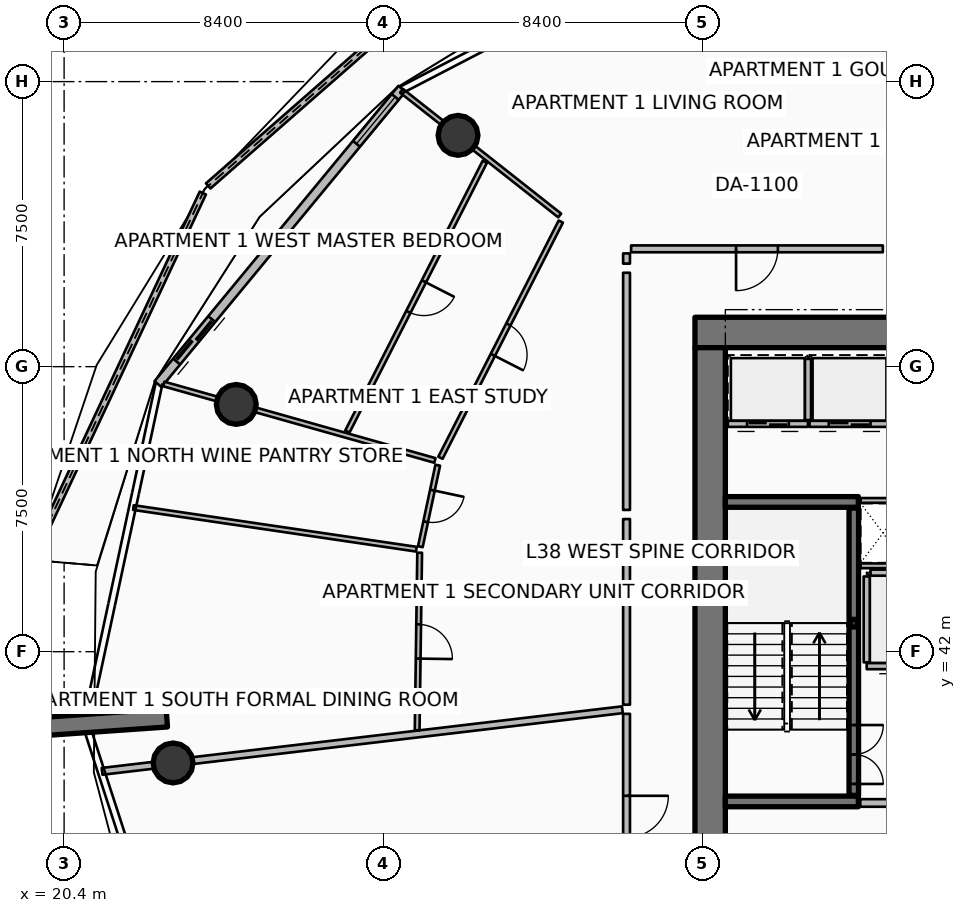
"""IFC4 building model, lengths in metres.
Left out: names, types, materials, properties, quantities, classifications, styles, units other than length and angle.
Written with IfcOpenShell. Run it as: python <this file> out.ifc"""

import sys

from ifc_helpers import new_model, si_unit, direction, frame, frame_2d, origin, origin_2d, place, context, subcontext, project, spatial, polyline, rectangle, hollow_rectangle, circle, outline, extrude, element, fill, save


model = new_model("IFC4")
c1 = context("Model", 3, precision=1e-05, world=origin(), true_north=direction((0.0, 1.0)))
c2 = subcontext(c1, "Body", "Model", "MODEL_VIEW")
j1 = project(units=[si_unit("LENGTHUNIT", "METRE"), si_unit("PLANEANGLEUNIT", "RADIAN")], contexts=[c1])
p1 = place(None, origin())
s1 = spatial("IfcSite", under=j1, at=p1, CompositionType="ELEMENT")
p2 = place(p1, origin())
s2 = spatial("IfcBuilding", under=s1, at=p2, CompositionType="ELEMENT")
p3 = place(p2, frame((0.0, 0.0, 154.05)))
s3 = spatial("IfcBuildingStorey", under=s2, at=p3, CompositionType="ELEMENT", Elevation=154.05)
p4 = place(p3, frame((37.0, 50.4, 0.0), z_axis=(0.0, 0.0, 1.0), x_axis=(1.0, 0.0, 0.0)))
e1 = element("IfcWall", 1, at=p4, inside=s3, PredefinedType="SHEAR", context=c2, shape_type="SweptSolid", body=[
    extrude(rectangle(XDim=9.9, YDim=0.8, at=frame_2d((4.95, 0.0))), origin(), (0.0, 0.0, 1.0), 3.75),
])
p5 = place(p3, frame((37.4, 34.0, 0.0), z_axis=(0.0, 0.0, 1.0), x_axis=(0.0, 1.0, 0.0)))
e2 = element("IfcWall", 2, at=p5, inside=s3, PredefinedType="SHEAR", context=c2, shape_type="SweptSolid", body=[
    extrude(rectangle(XDim=16.0, YDim=0.8, at=frame_2d((8.0, 0.0))), origin(), (0.0, 0.0, 1.0), 3.75),
])
for number, where, z_axis, x_axis in (
    (3, (37.8, 38.06, 0.0), (0.0, 0.0, 1.0), (1.0, 0.0, 0.0)),
    (4, (37.8, 45.94, 0.0), (0.0, 0.0, 1.0), (1.0, 0.0, 0.0)),
):
    element("IfcWall", number, at=place(p3, frame(where, z_axis=z_axis, x_axis=x_axis)), inside=s3, PredefinedType="SHEAR", context=c2, shape_type="SweptSolid", body=[
        extrude(rectangle(XDim=3.5, YDim=0.28, at=frame_2d((1.75, 0.0))), origin(), (0.0, 0.0, 1.0), 3.75),
    ])
p6 = place(p3, frame((41.18, 42.75, 0.0), z_axis=(0.0, 0.0, 1.0), x_axis=(1.0, 0.0, 0.0)))
e5 = element("IfcColumn", 5, at=p6, inside=s3, PredefinedType="COLUMN", context=c2, shape_type="SweptSolid", body=[
    extrude(hollow_rectangle(XDim=0.2, YDim=0.2, WallThickness=0.01, InnerFilletRadius=0.01, OuterFilletRadius=0.02, at=origin_2d()), origin(), (0.0, 0.0, 1.0), 1.67),
])
p7 = place(p3, frame((23.103, 40.259, 0.0), z_axis=(0.0, 0.0, 1.0), x_axis=(-0.997564163539, -0.069754853754, 0.0)))
e6 = element("IfcWall", 6, at=p7, inside=s3, PredefinedType="SOLIDWALL", context=c2, shape_type="SweptSolid", body=[
    extrude(rectangle(XDim=3.5, YDim=0.48, at=frame_2d((1.75, 0.0))), origin(), (0.0, 0.0, 1.0), 3.75),
])
for number, where, z_axis, x_axis in (
    (7, (30.766, 55.586, 0.0), (0.0, 0.0, 1.0), (1.0, 0.0, 0.0)),
    (8, (24.93, 48.506, 0.0), (0.0, 0.0, 1.0), (1.0, 0.0, 0.0)),
    (9, (23.267, 39.073, 0.0), (0.0, 0.0, 1.0), (1.0, 0.0, 0.0)),
):
    element("IfcColumn", number, at=place(p3, frame(where, z_axis=z_axis, x_axis=x_axis)), inside=s3, PredefinedType="COLUMN", context=c2, shape_type="SweptSolid", body=[
        extrude(circle(Radius=0.525, at=origin_2d()), origin(), (0.0, 0.0, 1.0), 3.5),
    ])
p8 = place(p3, frame((31.712, 60.836, 0.0), z_axis=(0.0, 0.0, 1.0), x_axis=(-0.752617556845, -0.658457905358, 0.0)))
e10 = element("IfcWall", 10, at=p8, inside=s3, PredefinedType="PARAPET", context=c2, shape_type="SweptSolid", body=[
    extrude(outline(polyline([(0.0, 0.0), (9.993, 0.0), (9.993, 1.148), (4.997, 1.284), (0.0, 1.483), (0.0, 0.0)])), frame((0.0, 0.09, 0.0), z_axis=(0.0, -1.0, 0.0), x_axis=(1.0, 0.0, 0.0)), (0.0, 0.0, 1.0), 0.18),
])
p9 = place(p3, frame((24.05, 54.068, 0.0), z_axis=(0.0, 0.0, 1.0), x_axis=(-0.424190329226, -0.905573058671, 0.0)))
e11 = element("IfcWall", 11, at=p9, inside=s3, PredefinedType="PARAPET", context=c2, shape_type="SweptSolid", body=[
    extrude(outline(polyline([(0.0, 0.0), (10.659, 0.0), (10.659, 1.224), (5.33, 1.127), (0.0, 1.148), (0.0, 0.0)])), frame((0.0, 0.09, 0.0), z_axis=(0.0, -1.0, 0.0), x_axis=(1.0, 0.0, 0.0)), (0.0, 0.0, 1.0), 0.18),
])
p10 = place(p3, frame((29.291, 56.813, 0.0), z_axis=(0.0, 0.0, 1.0), x_axis=(-0.636771922292, -0.77105221547, 0.0)))
e12 = element("IfcWall", 12, at=p10, inside=s3, PredefinedType="SOLIDWALL", context=c2, shape_type="SweptSolid", body=[
    extrude(rectangle(XDim=10.082, YDim=0.24, at=frame_2d((5.041, 0.0))), origin(), (0.0, 0.0, 1.0), 2.45),
])
p11 = place(p10, frame((7.862, 0.0, 0.0)))
e13 = element("IfcOpeningElement", 13, at=p11, cuts=e12, PredefinedType="OPENING", context=c2, shape_type="SweptSolid", body=[
    extrude(rectangle(XDim=1.45, YDim=2.15, at=frame_2d((0.725, 1.075))), frame((0.0, 0.13, 0.0), z_axis=(0.0, -1.0, 0.0), x_axis=(1.0, 0.0, 0.0)), (0.0, 0.0, 1.0), 0.26),
])
p12 = place(p10, frame((0.28, 0.0, 0.65)))
e14 = element("IfcOpeningElement", 14, at=p12, cuts=e12, PredefinedType="OPENING", context=c2, shape_type="SweptSolid", body=[
    extrude(rectangle(XDim=1.6, YDim=1.5, at=frame_2d((0.8, 0.75))), frame((0.0, 0.13, 0.0), z_axis=(0.0, -1.0, 0.0), x_axis=(1.0, 0.0, 0.0)), (0.0, 0.0, 1.0), 0.26),
])
p13 = place(p3, frame((41.18, 38.22, 0.0), z_axis=(0.0, 0.0, 1.0), x_axis=(0.0, 1.0, 0.0)))
e15 = element("IfcWall", 15, at=p13, inside=s3, PredefinedType="SOLIDWALL", context=c2, shape_type="SweptSolid", body=[
    extrude(rectangle(XDim=7.56, YDim=0.25, at=frame_2d((3.78, 0.0))), origin(), (0.0, 0.0, 1.0), 3.5),
])
p14 = place(p13, frame((0.3, 0.0, 0.0)))
e16 = element("IfcOpeningElement", 16, at=p14, cuts=e15, PredefinedType="OPENING", context=c2, shape_type="SweptSolid", body=[
    extrude(rectangle(XDim=1.55, YDim=2.15, at=frame_2d((0.775, 1.075))), frame((0.0, 0.135, 0.0), z_axis=(0.0, -1.0, 0.0), x_axis=(1.0, 0.0, 0.0)), (0.0, 0.0, 1.0), 0.27),
])
p15 = place(p3, frame((39.975, 47.995, 0.0), z_axis=(0.0, 0.0, 1.0), x_axis=(-1.0, 0.0, 0.0)))
e17 = element("IfcWall", 17, at=p15, inside=s3, PredefinedType="PARTITIONING", context=c2, shape_type="SweptSolid", body=[
    extrude(rectangle(XDim=2.11, YDim=0.16, at=frame_2d((1.055, 0.0))), origin(), (0.0, 0.0, 1.0), 3.5),
])
p16 = place(p15, frame((0.505, 0.0, 0.0)))
e18 = element("IfcOpeningElement", 18, at=p16, cuts=e17, PredefinedType="OPENING", context=c2, shape_type="SweptSolid", body=[
    extrude(rectangle(XDim=1.1, YDim=2.1, at=frame_2d((0.55, 1.05))), frame((0.0, 0.09, 0.0), z_axis=(0.0, -1.0, 0.0), x_axis=(1.0, 0.0, 0.0)), (0.0, 0.0, 1.0), 0.18),
])
p17 = place(p3, frame((39.975, 48.095, 0.0), z_axis=(0.0, 0.0, 1.0), x_axis=(0.0, 1.0, 0.0)))
e19 = element("IfcWall", 19, at=p17, inside=s3, PredefinedType="PARTITIONING", context=c2, shape_type="SweptSolid", body=[
    extrude(rectangle(XDim=1.61, YDim=0.16, at=frame_2d((0.805, 0.0))), origin(), (0.0, 0.0, 1.0), 3.5),
])
p18 = place(p3, frame((42.125, 47.995, 0.0), z_axis=(0.0, 0.0, 1.0), x_axis=(-1.0, 0.0, 0.0)))
e20 = element("IfcWall", 20, at=p18, inside=s3, PredefinedType="PARTITIONING", context=c2, shape_type="SweptSolid", body=[
    extrude(rectangle(XDim=2.11, YDim=0.16, at=frame_2d((1.055, 0.0))), origin(), (0.0, 0.0, 1.0), 3.5),
])
p19 = place(p18, frame((0.505, 0.0, 0.0)))
e21 = element("IfcOpeningElement", 21, at=p19, cuts=e20, PredefinedType="OPENING", context=c2, shape_type="SweptSolid", body=[
    extrude(rectangle(XDim=1.1, YDim=2.1, at=frame_2d((0.55, 1.05))), frame((0.0, 0.09, 0.0), z_axis=(0.0, -1.0, 0.0), x_axis=(1.0, 0.0, 0.0)), (0.0, 0.0, 1.0), 0.18),
])
p20 = place(p3, frame((43.78, 41.62, 0.0), z_axis=(0.0, 0.0, 1.0), x_axis=(-1.0, 0.0, 0.0)))
e22 = element("IfcWall", 22, at=p20, inside=s3, PredefinedType="PARTITIONING", context=c2, shape_type="SweptSolid", body=[
    extrude(rectangle(XDim=2.26, YDim=0.16, at=frame_2d((1.13, 0.0))), origin(), (0.0, 0.0, 1.0), 3.5),
])
p21 = place(p20, frame((0.58, 0.0, 0.0)))
e23 = element("IfcOpeningElement", 23, at=p21, cuts=e22, PredefinedType="OPENING", context=c2, shape_type="SweptSolid", body=[
    extrude(rectangle(XDim=1.1, YDim=2.1, at=frame_2d((0.55, 1.05))), frame((0.0, 0.09, 0.0), z_axis=(0.0, -1.0, 0.0), x_axis=(1.0, 0.0, 0.0)), (0.0, 0.0, 1.0), 0.18),
])
p22 = place(p3, frame((41.52, 41.72, 0.0), z_axis=(0.0, 0.0, 1.0), x_axis=(0.0, 1.0, 0.0)))
e24 = element("IfcWall", 24, at=p22, inside=s3, PredefinedType="PARTITIONING", context=c2, shape_type="SweptSolid", body=[
    extrude(rectangle(XDim=2.26, YDim=0.16, at=frame_2d((1.13, 0.0))), origin(), (0.0, 0.0, 1.0), 3.5),
])
p23 = place(p3, frame((41.62, 44.08, 0.0), z_axis=(0.0, 0.0, 1.0), x_axis=(1.0, 0.0, 0.0)))
e25 = element("IfcWall", 25, at=p23, inside=s3, PredefinedType="PARTITIONING", context=c2, shape_type="SweptSolid", body=[
    extrude(rectangle(XDim=2.06, YDim=0.16, at=frame_2d((1.03, 0.0))), origin(), (0.0, 0.0, 1.0), 3.5),
])
p24 = place(p3, frame((41.35, 38.02, 0.0), z_axis=(0.0, 0.0, 1.0), x_axis=(1.0, 0.0, 0.0)))
e26 = element("IfcWall", 26, at=p24, inside=s3, PredefinedType="PARTITIONING", context=c2, shape_type="SweptSolid", body=[
    extrude(rectangle(XDim=5.37, YDim=0.2, at=frame_2d((2.685, 0.0))), origin(), (0.0, 0.0, 1.0), 3.5),
])
p25 = place(p3, frame((41.36, 45.98, 0.0), z_axis=(0.0, 0.0, 1.0), x_axis=(1.0, 0.0, 0.0)))
e27 = element("IfcWall", 27, at=p25, inside=s3, PredefinedType="PARTITIONING", context=c2, shape_type="SweptSolid", body=[
    extrude(rectangle(XDim=5.36, YDim=0.125, at=frame_2d((2.68, 0.0))), origin(), (0.0, 0.0, 1.0), 2.94),
])
p26 = place(p3, frame((41.36, 44.26, 0.0), z_axis=(0.0, 0.0, 1.0), x_axis=(1.0, 0.0, 0.0)))
e28 = element("IfcWall", 28, at=p26, inside=s3, PredefinedType="PARTITIONING", context=c2, shape_type="SweptSolid", body=[
    extrude(rectangle(XDim=2.5, YDim=0.125, at=frame_2d((1.25, 0.0))), origin(), (0.0, 0.0, 1.0), 2.94),
])
p27 = place(p3, frame((35.091, 40.472, 0.0), z_axis=(0.0, 0.0, 1.0), x_axis=(-0.993067434621, -0.11754603479, 0.0)))
e29 = element("IfcWall", 29, at=p27, inside=s3, PredefinedType="PARTITIONING", context=c2, shape_type="SweptSolid", body=[
    extrude(rectangle(XDim=13.787, YDim=0.18, at=frame_2d((6.894, 0.0))), origin(), (0.0, 0.0, 1.0), 2.94),
])
p28 = place(p3, frame((41.944, 52.6, 0.0), z_axis=(0.0, 0.0, 1.0), x_axis=(-1.0, 0.0, 0.0)))
e30 = element("IfcWall", 30, at=p28, inside=s3, PredefinedType="PARTITIONING", context=c2, shape_type="SweptSolid", body=[
    extrude(rectangle(XDim=6.624, YDim=0.18, at=frame_2d((3.312, 0.0))), origin(), (0.0, 0.0, 1.0), 2.94),
])
p29 = place(p28, frame((2.762, 0.0, 0.0)))
e31 = element("IfcOpeningElement", 31, at=p29, cuts=e30, PredefinedType="OPENING", context=c2, shape_type="SweptSolid", body=[
    extrude(rectangle(XDim=1.1, YDim=2.1, at=frame_2d((0.55, 1.05))), frame((0.0, 0.1, 0.0), z_axis=(0.0, -1.0, 0.0), x_axis=(1.0, 0.0, 0.0)), (0.0, 0.0, 1.0), 0.2),
])
p30 = place(p3, frame((35.2, 52.48, 0.0), z_axis=(0.0, 0.0, 1.0), x_axis=(0.0, -1.0, 0.0)))
e32 = element("IfcWall", 32, at=p30, inside=s3, PredefinedType="PARTITIONING", context=c2, shape_type="SweptSolid", body=[
    extrude(rectangle(XDim=0.269, YDim=0.18, at=frame_2d((0.135, 0.0))), origin(), (0.0, 0.0, 1.0), 2.94),
])
p31 = place(p3, frame((35.2, 51.971, 0.0), z_axis=(0.0, 0.0, 1.0), x_axis=(0.0, -1.0, 0.0)))
e33 = element("IfcWall", 33, at=p31, inside=s3, PredefinedType="PARTITIONING", context=c2, shape_type="SweptSolid", body=[
    extrude(rectangle(XDim=6.241, YDim=0.18, at=frame_2d((3.12, 0.0))), origin(), (0.0, 0.0, 1.0), 2.94),
])
p32 = place(p3, frame((33.441, 53.477, 0.0), z_axis=(0.0, 0.0, 1.0), x_axis=(-0.785319981095, 0.619090080112, 0.0)))
e34 = element("IfcWall", 34, at=p32, inside=s3, PredefinedType="PARTITIONING", context=c2, shape_type="SweptSolid", body=[
    extrude(rectangle(XDim=5.301, YDim=0.125, at=frame_2d((2.65, 0.0))), origin(), (0.0, 0.0, 1.0), 2.94),
])
p33 = place(p3, frame((33.469, 53.317, 0.0), z_axis=(0.0, 0.0, 1.0), x_axis=(-0.453977694262, -0.891013048789, 0.0)))
e35 = element("IfcWall", 35, at=p33, inside=s3, PredefinedType="PARTITIONING", context=c2, shape_type="SweptSolid", body=[
    extrude(rectangle(XDim=6.974, YDim=0.125, at=frame_2d((3.487, 0.0))), origin(), (0.0, 0.0, 1.0), 2.94),
])
p34 = place(p33, frame((3.037, 0.0, 0.0)))
e36 = element("IfcOpeningElement", 36, at=p34, cuts=e35, PredefinedType="OPENING", context=c2, shape_type="SweptSolid", body=[
    extrude(rectangle(XDim=0.9, YDim=2.08, at=frame_2d((0.45, 1.04))), frame((0.0, 0.073, 0.0), z_axis=(0.0, -1.0, 0.0), x_axis=(1.0, 0.0, 0.0)), (0.0, 0.0, 1.0), 0.145),
])
p35 = place(p3, frame((31.472, 54.892, 0.0), z_axis=(0.0, 0.0, 1.0), x_axis=(-0.453991424948, -0.89100605277, 0.0)))
e37 = element("IfcWall", 37, at=p35, inside=s3, PredefinedType="PARTITIONING", context=c2, shape_type="SweptSolid", body=[
    extrude(rectangle(XDim=7.967, YDim=0.125, at=frame_2d((3.983, 0.0))), origin(), (0.0, 0.0, 1.0), 2.94),
])
p36 = place(p35, frame((3.534, 0.0, 0.0)))
e38 = element("IfcOpeningElement", 38, at=p36, cuts=e37, PredefinedType="OPENING", context=c2, shape_type="SweptSolid", body=[
    extrude(rectangle(XDim=0.9, YDim=2.08, at=frame_2d((0.45, 1.04))), frame((0.0, 0.073, 0.0), z_axis=(0.0, -1.0, 0.0), x_axis=(1.0, 0.0, 0.0)), (0.0, 0.0, 1.0), 0.145),
])
p37 = place(p3, frame((35.2, 45.49, 0.0), z_axis=(0.0, 0.0, 1.0), x_axis=(0.0, -1.0, 0.0)))
e39 = element("IfcWall", 39, at=p37, inside=s3, PredefinedType="PARTITIONING", context=c2, shape_type="SweptSolid", body=[
    extrude(rectangle(XDim=4.885, YDim=0.18, at=frame_2d((2.442, 0.0))), origin(), (0.0, 0.0, 1.0), 2.94),
])
p38 = place(p3, frame((30.157, 47.032, 0.0), z_axis=(0.0, 0.0, 1.0), x_axis=(-0.962456736489, 0.271435131084, 0.0)))
e40 = element("IfcWall", 40, at=p38, inside=s3, PredefinedType="PARTITIONING", context=c2, shape_type="SweptSolid", body=[
    extrude(rectangle(XDim=7.412, YDim=0.125, at=frame_2d((3.706, 0.0))), origin(), (0.0, 0.0, 1.0), 2.94),
])
p39 = place(p3, frame((29.668, 44.697, 0.0), z_axis=(0.0, 0.0, 1.0), x_axis=(-0.989352403942, 0.145539756815, 0.0)))
e41 = element("IfcWall", 41, at=p39, inside=s3, PredefinedType="PARTITIONING", context=c2, shape_type="SweptSolid", body=[
    extrude(rectangle(XDim=7.525, YDim=0.125, at=frame_2d((3.763, 0.0))), origin(), (0.0, 0.0, 1.0), 2.94),
])
p40 = place(p3, frame((30.232, 46.907, 0.0), z_axis=(0.0, 0.0, 1.0), x_axis=(-0.208920938613, -0.977932534181, 0.0)))
e42 = element("IfcWall", 42, at=p40, inside=s3, PredefinedType="PARTITIONING", context=c2, shape_type="SweptSolid", body=[
    extrude(rectangle(XDim=2.193, YDim=0.125, at=frame_2d((1.097, 0.0))), origin(), (0.0, 0.0, 1.0), 2.94),
])
p41 = place(p40, frame((0.672, 0.0, 0.0)))
e43 = element("IfcOpeningElement", 43, at=p41, cuts=e42, PredefinedType="OPENING", context=c2, shape_type="SweptSolid", body=[
    extrude(rectangle(XDim=0.85, YDim=2.06, at=frame_2d((0.425, 1.03))), frame((0.0, 0.073, 0.0), z_axis=(0.0, -1.0, 0.0), x_axis=(1.0, 0.0, 0.0)), (0.0, 0.0, 1.0), 0.145),
])
p42 = place(p3, frame((29.756, 44.604, 0.0), z_axis=(0.0, 0.0, 1.0), x_axis=(-0.014161849223, -0.999899715985, 0.0)))
e44 = element("IfcWall", 44, at=p42, inside=s3, PredefinedType="PARTITIONING", context=c2, shape_type="SweptSolid", body=[
    extrude(rectangle(XDim=4.672, YDim=0.125, at=frame_2d((2.336, 0.0))), origin(), (0.0, 0.0, 1.0), 2.94),
])
p43 = place(p42, frame((1.886, 0.0, 0.0)))
e45 = element("IfcOpeningElement", 45, at=p43, cuts=e44, PredefinedType="OPENING", context=c2, shape_type="SweptSolid", body=[
    extrude(rectangle(XDim=0.9, YDim=2.08, at=frame_2d((0.45, 1.04))), frame((0.0, 0.073, 0.0), z_axis=(0.0, -1.0, 0.0), x_axis=(1.0, 0.0, 0.0)), (0.0, 0.0, 1.0), 0.145),
])
p44 = place(p3, frame((35.2, 40.365, 0.0), z_axis=(0.0, 0.0, 1.0), x_axis=(0.0, -1.0, 0.0)))
e46 = element("IfcWall", 46, at=p44, inside=s3, PredefinedType="PARTITIONING", context=c2, shape_type="SweptSolid", body=[
    extrude(rectangle(XDim=5.413, YDim=0.18, at=frame_2d((2.707, 0.0))), origin(), (0.0, 0.0, 1.0), 2.94),
])
p45 = place(p44, frame((2.156, 0.0, 0.0)))
e47 = element("IfcOpeningElement", 47, at=p45, cuts=e46, PredefinedType="OPENING", context=c2, shape_type="SweptSolid", body=[
    extrude(rectangle(XDim=1.1, YDim=2.1, at=frame_2d((0.55, 1.05))), frame((0.0, 0.1, 0.0), z_axis=(0.0, -1.0, 0.0), x_axis=(1.0, 0.0, 0.0)), (0.0, 0.0, 1.0), 0.2),
])
p46 = place(p11, origin())
e48 = element("IfcDoor", 48, at=p46, inside=s3, OperationType="DOUBLE_DOOR_SLIDING", PredefinedType="DOOR", context=c2, shape_type="SweptSolid", body=[
    extrude(rectangle(XDim=1.45, YDim=2.15, at=frame_2d((0.725, 1.075))), frame((0.0, 0.025, 0.0), z_axis=(0.0, -1.0, 0.0), x_axis=(1.0, 0.0, 0.0)), (0.0, 0.0, 1.0), 0.05),
])
fill(e13, e48)
p47 = place(p12, origin())
e49 = element("IfcWindow", 49, at=p47, inside=s3, PartitioningType="SINGLE_PANEL", PredefinedType="WINDOW", context=c2, shape_type="SweptSolid", body=[
    extrude(rectangle(XDim=1.6, YDim=1.5, at=frame_2d((0.8, 0.75))), frame((0.0, 0.03, 0.0), z_axis=(0.0, -1.0, 0.0), x_axis=(1.0, 0.0, 0.0)), (0.0, 0.0, 1.0), 0.06),
])
fill(e14, e49)
p48 = place(p14, origin())
e50 = element("IfcDoor", 50, at=p48, inside=s3, OperationType="DOUBLE_DOOR_SINGLE_SWING", PredefinedType="DOOR", context=c2, shape_type="SweptSolid", body=[
    extrude(rectangle(XDim=1.55, YDim=2.15, at=frame_2d((0.775, 1.075))), frame((0.0, 0.025, 0.0), z_axis=(0.0, -1.0, 0.0), x_axis=(1.0, 0.0, 0.0)), (0.0, 0.0, 1.0), 0.05),
])
fill(e16, e50)
p49 = place(p16, origin())
e51 = element("IfcDoor", 51, at=p49, inside=s3, OperationType="DOUBLE_DOOR_SLIDING", PredefinedType="DOOR", context=c2, shape_type="SweptSolid", body=[
    extrude(rectangle(XDim=1.1, YDim=2.1, at=frame_2d((0.55, 1.05))), frame((0.0, 0.025, 0.0), z_axis=(0.0, -1.0, 0.0), x_axis=(1.0, 0.0, 0.0)), (0.0, 0.0, 1.0), 0.05),
])
fill(e18, e51)
p50 = place(p19, origin())
e52 = element("IfcDoor", 52, at=p50, inside=s3, OperationType="DOUBLE_DOOR_SLIDING", PredefinedType="DOOR", context=c2, shape_type="SweptSolid", body=[
    extrude(rectangle(XDim=1.1, YDim=2.1, at=frame_2d((0.55, 1.05))), frame((0.0, 0.025, 0.0), z_axis=(0.0, -1.0, 0.0), x_axis=(1.0, 0.0, 0.0)), (0.0, 0.0, 1.0), 0.05),
])
fill(e21, e52)
p51 = place(p29, origin())
e53 = element("IfcDoor", 53, at=p51, inside=s3, OperationType="SINGLE_SWING_RIGHT", PredefinedType="DOOR", context=c2, shape_type="SweptSolid", body=[
    extrude(rectangle(XDim=1.1, YDim=2.1, at=frame_2d((0.55, 1.05))), frame((0.0, 0.025, 0.0), z_axis=(0.0, -1.0, 0.0), x_axis=(1.0, 0.0, 0.0)), (0.0, 0.0, 1.0), 0.05),
])
fill(e31, e53)
p52 = place(p34, origin())
e54 = element("IfcDoor", 54, at=p52, inside=s3, OperationType="SINGLE_SWING_RIGHT", PredefinedType="DOOR", context=c2, shape_type="SweptSolid", body=[
    extrude(rectangle(XDim=0.9, YDim=2.08, at=frame_2d((0.45, 1.04))), frame((0.0, 0.025, 0.0), z_axis=(0.0, -1.0, 0.0), x_axis=(1.0, 0.0, 0.0)), (0.0, 0.0, 1.0), 0.05),
])
fill(e36, e54)
p53 = place(p36, origin())
e55 = element("IfcDoor", 55, at=p53, inside=s3, OperationType="SINGLE_SWING_LEFT", PredefinedType="DOOR", context=c2, shape_type="SweptSolid", body=[
    extrude(rectangle(XDim=0.9, YDim=2.08, at=frame_2d((0.45, 1.04))), frame((0.0, 0.025, 0.0), z_axis=(0.0, -1.0, 0.0), x_axis=(1.0, 0.0, 0.0)), (0.0, 0.0, 1.0), 0.05),
])
fill(e38, e55)
p54 = place(p41, origin())
e56 = element("IfcDoor", 56, at=p54, inside=s3, OperationType="SINGLE_SWING_LEFT", PredefinedType="DOOR", context=c2, shape_type="SweptSolid", body=[
    extrude(rectangle(XDim=0.85, YDim=2.06, at=frame_2d((0.425, 1.03))), frame((0.0, 0.025, 0.0), z_axis=(0.0, -1.0, 0.0), x_axis=(1.0, 0.0, 0.0)), (0.0, 0.0, 1.0), 0.05),
])
fill(e43, e56)
p55 = place(p43, origin())
e57 = element("IfcDoor", 57, at=p55, inside=s3, OperationType="SINGLE_SWING_RIGHT", PredefinedType="DOOR", context=c2, shape_type="SweptSolid", body=[
    extrude(rectangle(XDim=0.9, YDim=2.08, at=frame_2d((0.45, 1.04))), frame((0.0, 0.025, 0.0), z_axis=(0.0, -1.0, 0.0), x_axis=(1.0, 0.0, 0.0)), (0.0, 0.0, 1.0), 0.05),
])
fill(e45, e57)
p56 = place(p45, origin())
e58 = element("IfcDoor", 58, at=p56, inside=s3, OperationType="SINGLE_SWING_LEFT", PredefinedType="DOOR", context=c2, shape_type="SweptSolid", body=[
    extrude(rectangle(XDim=1.1, YDim=2.1, at=frame_2d((0.55, 1.05))), frame((0.0, 0.025, 0.0), z_axis=(0.0, -1.0, 0.0), x_axis=(1.0, 0.0, 0.0)), (0.0, 0.0, 1.0), 0.05),
])
fill(e47, e58)
save(model, sys.argv[1])
